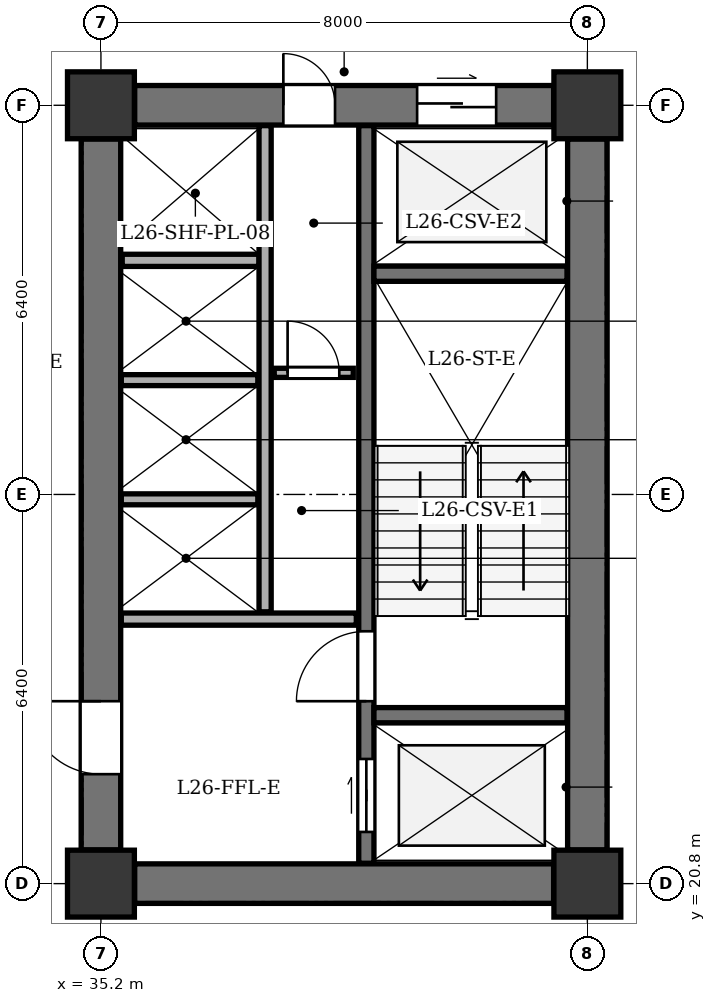
"""IFC4 building model, lengths in metres.
Left out: names, types, materials, properties, quantities, classifications, styles, units other than length and angle.
Written with IfcOpenShell. Run it as: python <this file> out.ifc"""

import sys

from ifc_helpers import new_model, si_unit, direction, frame, frame_2d, origin, origin_2d, place, context, subcontext, project, spatial, rectangle, extrude, element, fill, save


model = new_model("IFC4")
c1 = context("Model", 3, precision=1e-05, world=origin(), true_north=direction((0.0, 1.0)))
c2 = subcontext(c1, "Body", "Model", "MODEL_VIEW")
j1 = project(units=[si_unit("LENGTHUNIT", "METRE"), si_unit("PLANEANGLEUNIT", "RADIAN")], contexts=[c1])
p1 = place(None, origin())
s1 = spatial("IfcSite", under=j1, at=p1, CompositionType="ELEMENT")
p2 = place(p1, origin())
s2 = spatial("IfcBuilding", under=s1, at=p2, CompositionType="ELEMENT")
p3 = place(p2, frame((0.0, 0.0, 106.2)))
s3 = spatial("IfcBuildingStorey", under=s2, at=p3, CompositionType="ELEMENT", Elevation=106.2)
for number, where, z_axis, x_axis in (
    (1, (35.2, 20.8, 0.0), (0.0, 0.0, 1.0), (1.0, 0.0, 0.0)),
    (2, (43.2, 20.8, 0.0), (0.0, 0.0, 1.0), (1.0, 0.0, 0.0)),
    (3, (35.2, 33.6, 0.0), (0.0, 0.0, 1.0), (1.0, 0.0, 0.0)),
    (4, (43.2, 33.6, 0.0), (0.0, 0.0, 1.0), (1.0, 0.0, 0.0)),
):
    element("IfcColumn", number, at=place(p3, frame(where, z_axis=z_axis, x_axis=x_axis)), inside=s3, PredefinedType="COLUMN", context=c2, shape_type="SweptSolid", body=[
        extrude(rectangle(XDim=1.1, YDim=1.1, at=origin_2d()), origin(), (0.0, 0.0, 1.0), 3.9),
    ])
p4 = place(p3, frame((43.2, 21.355, 0.0), z_axis=(0.0, 0.0, 1.0), x_axis=(0.0, 1.0, 0.0)))
e5 = element("IfcWall", 5, at=p4, inside=s3, PredefinedType="SHEAR", context=c2, shape_type="SweptSolid", body=[
    extrude(rectangle(XDim=11.69, YDim=0.65, at=frame_2d((5.845, 0.0))), origin(), (0.0, 0.0, 1.0), 3.45),
])
p5 = place(p3, frame((35.755, 20.8, 0.0), z_axis=(0.0, 0.0, 1.0), x_axis=(1.0, 0.0, 0.0)))
e6 = element("IfcWall", 6, at=p5, inside=s3, PredefinedType="SHEAR", context=c2, shape_type="SweptSolid", body=[
    extrude(rectangle(XDim=6.89, YDim=0.65, at=frame_2d((3.445, 0.0))), origin(), (0.0, 0.0, 1.0), 3.45),
])
p6 = place(p3, frame((35.755, 33.6, 0.0), z_axis=(0.0, 0.0, 1.0), x_axis=(1.0, 0.0, 0.0)))
e7 = element("IfcWall", 7, at=p6, inside=s3, PredefinedType="SHEAR", context=c2, shape_type="SweptSolid", body=[
    extrude(rectangle(XDim=6.89, YDim=0.65, at=frame_2d((3.445, 0.0))), origin(), (0.0, 0.0, 1.0), 3.45),
])
p7 = place(p6, frame((4.645, 0.0, 0.0)))
e8 = element("IfcOpeningElement", 8, at=p7, cuts=e7, PredefinedType="OPENING", context=c2, shape_type="SweptSolid", body=[
    extrude(rectangle(XDim=1.3, YDim=2.15, at=frame_2d((0.65, 1.075))), frame((0.0, 0.335, 0.0), z_axis=(0.0, -1.0, 0.0), x_axis=(1.0, 0.0, 0.0)), (0.0, 0.0, 1.0), 0.67),
])
p8 = place(p6, frame((2.445, 0.0, 0.0)))
e9 = element("IfcOpeningElement", 9, at=p8, cuts=e7, PredefinedType="OPENING", context=c2, shape_type="SweptSolid", body=[
    extrude(rectangle(XDim=0.85, YDim=2.02, at=frame_2d((0.425, 1.01))), frame((0.0, 0.335, 0.0), z_axis=(0.0, -1.0, 0.0), x_axis=(1.0, 0.0, 0.0)), (0.0, 0.0, 1.0), 0.67),
])
p9 = place(p3, frame((35.2, 21.355, 0.0), z_axis=(0.0, 0.0, 1.0), x_axis=(0.0, 1.0, 0.0)))
e10 = element("IfcWall", 10, at=p9, inside=s3, PredefinedType="SHEAR", context=c2, shape_type="SweptSolid", body=[
    extrude(rectangle(XDim=11.69, YDim=0.65, at=frame_2d((5.845, 0.0))), origin(), (0.0, 0.0, 1.0), 3.45),
])
p10 = place(p9, frame((1.245, 0.0, 0.0)))
e11 = element("IfcOpeningElement", 11, at=p10, cuts=e10, PredefinedType="OPENING", context=c2, shape_type="SweptSolid", body=[
    extrude(rectangle(XDim=1.2, YDim=2.15, at=frame_2d((0.6, 1.075))), frame((0.0, 0.335, 0.0), z_axis=(0.0, -1.0, 0.0), x_axis=(1.0, 0.0, 0.0)), (0.0, 0.0, 1.0), 0.67),
])
p11 = place(p3, frame((39.565, 21.135, 0.0), z_axis=(0.0, 0.0, 1.0), x_axis=(0.0, 1.0, 0.0)))
e12 = element("IfcWall", 12, at=p11, inside=s3, PredefinedType="SHEAR", context=c2, shape_type="SweptSolid", body=[
    extrude(rectangle(XDim=12.13, YDim=0.25, at=frame_2d((6.065, 0.0))), origin(), (0.0, 0.0, 1.0), 3.45),
])
p12 = place(p11, frame((0.515, 0.0, 0.0)))
e13 = element("IfcOpeningElement", 13, at=p12, cuts=e12, PredefinedType="OPENING", context=c2, shape_type="SweptSolid", body=[
    extrude(rectangle(XDim=1.2, YDim=2.15, at=frame_2d((0.6, 1.075))), frame((0.0, 0.135, 0.0), z_axis=(0.0, -1.0, 0.0), x_axis=(1.0, 0.0, 0.0)), (0.0, 0.0, 1.0), 0.27),
])
p13 = place(p11, frame((2.665, 0.0, 0.0)))
e14 = element("IfcOpeningElement", 14, at=p13, cuts=e12, PredefinedType="OPENING", context=c2, shape_type="SweptSolid", body=[
    extrude(rectangle(XDim=1.15, YDim=2.15, at=frame_2d((0.575, 1.075))), frame((0.0, 0.135, 0.0), z_axis=(0.0, -1.0, 0.0), x_axis=(1.0, 0.0, 0.0)), (0.0, 0.0, 1.0), 0.27),
])
for number, where, z_axis, x_axis in (
    (15, (39.69, 23.57, 0.0), (0.0, 0.0, 1.0), (1.0, 0.0, 0.0)),
    (16, (39.69, 30.83, 0.0), (0.0, 0.0, 1.0), (1.0, 0.0, 0.0)),
):
    element("IfcWall", number, at=place(p3, frame(where, z_axis=z_axis, x_axis=x_axis)), inside=s3, PredefinedType="SHEAR", context=c2, shape_type="SweptSolid", body=[
        extrude(rectangle(XDim=3.175, YDim=0.25, at=frame_2d((1.587, 0.0))), origin(), (0.0, 0.0, 1.0), 3.45),
    ])
p14 = place(p3, frame((35.535, 25.15, 0.0), z_axis=(0.0, 0.0, 1.0), x_axis=(1.0, 0.0, 0.0)))
e17 = element("IfcWall", 17, at=p14, inside=s3, PredefinedType="SOLIDWALL", context=c2, shape_type="SweptSolid", body=[
    extrude(rectangle(XDim=3.865, YDim=0.2, at=frame_2d((1.933, 0.0))), origin(), (0.0, 0.0, 1.0), 3.45),
])
p15 = place(p3, frame((35.55, 31.05, 0.0), z_axis=(0.0, 0.0, 1.0), x_axis=(1.0, 0.0, 0.0)))
e18 = element("IfcWall", 18, at=p15, inside=s3, PredefinedType="SOLIDWALL", context=c2, shape_type="SweptSolid", body=[
    extrude(rectangle(XDim=2.25, YDim=0.2, at=frame_2d((1.125, 0.0))), origin(), (0.0, 0.0, 1.0), 3.45),
])
p16 = place(p3, frame((37.9, 25.27, 0.0), z_axis=(0.0, 0.0, 1.0), x_axis=(0.0, 1.0, 0.0)))
e19 = element("IfcWall", 19, at=p16, inside=s3, PredefinedType="SOLIDWALL", context=c2, shape_type="SweptSolid", body=[
    extrude(rectangle(XDim=7.995, YDim=0.2, at=frame_2d((3.998, 0.0))), origin(), (0.0, 0.0, 1.0), 3.45),
])
for number, where, z_axis, x_axis in (
    (20, (35.535, 27.12, 0.0), (0.0, 0.0, 1.0), (1.0, 0.0, 0.0)),
    (21, (35.535, 29.08, 0.0), (0.0, 0.0, 1.0), (1.0, 0.0, 0.0)),
):
    element("IfcWall", number, at=place(p3, frame(where, z_axis=z_axis, x_axis=x_axis)), inside=s3, PredefinedType="PARTITIONING", context=c2, shape_type="SweptSolid", body=[
        extrude(rectangle(XDim=2.245, YDim=0.18, at=frame_2d((1.123, 0.0))), origin(), (0.0, 0.0, 1.0), 3.45),
    ])
p17 = place(p3, frame((38.05, 29.2, 0.0), z_axis=(0.0, 0.0, 1.0), x_axis=(1.0, 0.0, 0.0)))
e22 = element("IfcWall", 22, at=p17, inside=s3, PredefinedType="PARTITIONING", context=c2, shape_type="SweptSolid", body=[
    extrude(rectangle(XDim=1.3, YDim=0.15, at=frame_2d((0.65, 0.0))), origin(), (0.0, 0.0, 1.0), 3.45),
])
p18 = place(p17, frame((0.22, 0.0, 0.0)))
e23 = element("IfcOpeningElement", 23, at=p18, cuts=e22, PredefinedType="OPENING", context=c2, shape_type="SweptSolid", body=[
    extrude(rectangle(XDim=0.85, YDim=2.02, at=frame_2d((0.425, 1.01))), frame((0.0, 0.085, 0.0), z_axis=(0.0, -1.0, 0.0), x_axis=(1.0, 0.0, 0.0)), (0.0, 0.0, 1.0), 0.17),
])
p19 = place(p7, origin())
e24 = element("IfcDoor", 24, at=p19, inside=s3, OperationType="DOUBLE_DOOR_SLIDING", PredefinedType="DOOR", context=c2, shape_type="SweptSolid", body=[
    extrude(rectangle(XDim=1.3, YDim=2.15, at=frame_2d((0.65, 1.075))), frame((0.0, 0.025, 0.0), z_axis=(0.0, -1.0, 0.0), x_axis=(1.0, 0.0, 0.0)), (0.0, 0.0, 1.0), 0.05),
])
fill(e8, e24)
p20 = place(p8, origin())
e25 = element("IfcDoor", 25, at=p20, inside=s3, OperationType="SINGLE_SWING_LEFT", PredefinedType="DOOR", context=c2, shape_type="SweptSolid", body=[
    extrude(rectangle(XDim=0.85, YDim=2.02, at=frame_2d((0.425, 1.01))), frame((0.0, 0.025, 0.0), z_axis=(0.0, -1.0, 0.0), x_axis=(1.0, 0.0, 0.0)), (0.0, 0.0, 1.0), 0.05),
])
fill(e9, e25)
p21 = place(p10, origin())
e26 = element("IfcDoor", 26, at=p21, inside=s3, OperationType="SINGLE_SWING_RIGHT", PredefinedType="DOOR", context=c2, shape_type="SweptSolid", body=[
    extrude(rectangle(XDim=1.2, YDim=2.15, at=frame_2d((0.6, 1.075))), frame((0.0, 0.025, 0.0), z_axis=(0.0, -1.0, 0.0), x_axis=(1.0, 0.0, 0.0)), (0.0, 0.0, 1.0), 0.05),
])
fill(e11, e26)
p22 = place(p12, origin())
e27 = element("IfcDoor", 27, at=p22, inside=s3, OperationType="DOUBLE_DOOR_SLIDING", PredefinedType="DOOR", context=c2, shape_type="SweptSolid", body=[
    extrude(rectangle(XDim=1.2, YDim=2.15, at=frame_2d((0.6, 1.075))), frame((0.0, 0.025, 0.0), z_axis=(0.0, -1.0, 0.0), x_axis=(1.0, 0.0, 0.0)), (0.0, 0.0, 1.0), 0.05),
])
fill(e13, e27)
p23 = place(p13, origin())
e28 = element("IfcDoor", 28, at=p23, inside=s3, OperationType="SINGLE_SWING_LEFT", PredefinedType="DOOR", context=c2, shape_type="SweptSolid", body=[
    extrude(rectangle(XDim=1.15, YDim=2.15, at=frame_2d((0.575, 1.075))), frame((0.0, 0.025, 0.0), z_axis=(0.0, -1.0, 0.0), x_axis=(1.0, 0.0, 0.0)), (0.0, 0.0, 1.0), 0.05),
])
fill(e14, e28)
p24 = place(p18, origin())
e29 = element("IfcDoor", 29, at=p24, inside=s3, OperationType="SINGLE_SWING_LEFT", PredefinedType="DOOR", context=c2, shape_type="SweptSolid", body=[
    extrude(rectangle(XDim=0.85, YDim=2.02, at=frame_2d((0.425, 1.01))), frame((0.0, 0.025, 0.0), z_axis=(0.0, -1.0, 0.0), x_axis=(1.0, 0.0, 0.0)), (0.0, 0.0, 1.0), 0.05),
])
fill(e23, e29)
save(model, sys.argv[1])
